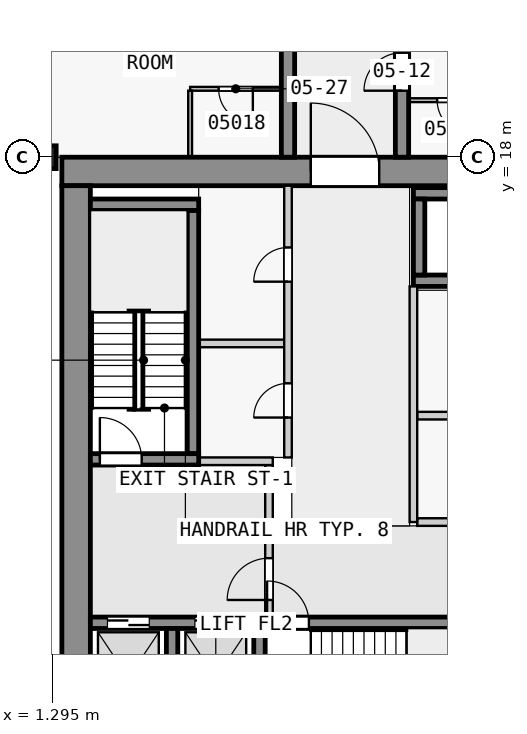
"""IFC4 building model, lengths in metres.
Left out: names, types, materials, properties, quantities, classifications, styles, units other than length and angle.
Written with IfcOpenShell. Run it as: python <this file> out.ifc"""

import sys

from ifc_helpers import new_model, si_unit, direction, frame, frame_2d, origin, origin_2d, place, context, subcontext, project, spatial, rectangle, extrude, element, fill, save


model = new_model("IFC4")
c1 = context("Model", 3, precision=1e-05, world=origin(), true_north=direction((0.0, 1.0)))
c2 = subcontext(c1, "Body", "Model", "MODEL_VIEW")
j1 = project(units=[si_unit("LENGTHUNIT", "METRE"), si_unit("PLANEANGLEUNIT", "RADIAN")], contexts=[c1])
p1 = place(None, origin())
s1 = spatial("IfcSite", under=j1, at=p1, CompositionType="ELEMENT")
p2 = place(p1, origin())
s2 = spatial("IfcBuilding", under=s1, at=p2, CompositionType="ELEMENT")
p3 = place(p2, frame((0.0, 0.0, 26.8)))
s3 = spatial("IfcBuildingStorey", under=s2, at=p3, CompositionType="ELEMENT", Elevation=26.8)
p4 = place(p3, frame((0.7, 18.0, 0.0), z_axis=(0.0, 0.0, 1.0), x_axis=(0.0, 1.0, 0.0)))
e1 = element("IfcColumn", 1, at=p4, inside=s3, PredefinedType="COLUMN", context=c2, shape_type="SweptSolid", body=[
    extrude(rectangle(XDim=0.6, YDim=1.4, at=origin_2d()), origin(), (0.0, 0.0, 1.0), 3.5),
])
p5 = place(p3, frame((1.55, 17.625, 0.0), z_axis=(0.0, 0.0, 1.0), x_axis=(1.0, 0.0, 0.0)))
e2 = element("IfcWall", 2, at=p5, inside=s3, PredefinedType="SHEAR", context=c2, shape_type="SweptSolid", body=[
    extrude(rectangle(XDim=20.95, YDim=0.75, at=frame_2d((10.475, 0.0))), origin(), (0.0, 0.0, 1.0), 3.25),
])
p6 = place(p5, frame((6.55, 0.0, 0.0)))
e3 = element("IfcOpeningElement", 3, at=p6, cuts=e2, PredefinedType="OPENING", context=c2, shape_type="SweptSolid", body=[
    extrude(rectangle(XDim=1.8, YDim=2.1, at=frame_2d((0.9, 1.05))), frame((0.0, 0.385, 0.0), z_axis=(0.0, -1.0, 0.0), x_axis=(1.0, 0.0, 0.0)), (0.0, 0.0, 1.0), 0.77),
])
p7 = place(p3, frame((1.925, 2.5, 0.0), z_axis=(0.0, 0.0, 1.0), x_axis=(0.0, 1.0, 0.0)))
e4 = element("IfcWall", 4, at=p7, inside=s3, PredefinedType="SHEAR", context=c2, shape_type="SweptSolid", body=[
    extrude(rectangle(XDim=14.75, YDim=0.75, at=frame_2d((7.375, 0.0))), origin(), (0.0, 0.0, 1.0), 3.25),
])
for number, where, z_axis, x_axis in (
    (5, (4.45, 2.8, 0.0), (0.0, 0.0, 1.0), (0.0, 1.0, 0.0)),
    (6, (6.75, 2.8, 0.0), (0.0, 0.0, 1.0), (0.0, 1.0, 0.0)),
):
    element("IfcWall", number, at=place(p3, frame(where, z_axis=z_axis, x_axis=x_axis)), inside=s3, PredefinedType="SHEAR", context=c2, shape_type="SweptSolid", body=[
        extrude(rectangle(XDim=2.8, YDim=0.3, at=frame_2d((1.4, 0.0))), origin(), (0.0, 0.0, 1.0), 3.25),
    ])
p8 = place(p3, frame((2.3, 5.75, 0.0), z_axis=(0.0, 0.0, 1.0), x_axis=(1.0, 0.0, 0.0)))
e7 = element("IfcWall", 7, at=p8, inside=s3, PredefinedType="SHEAR", context=c2, shape_type="SweptSolid", body=[
    extrude(rectangle(XDim=18.8, YDim=0.3, at=frame_2d((9.4, 0.0))), origin(), (0.0, 0.0, 1.0), 3.25),
])
p9 = place(p8, frame((4.65, 0.0, 0.0)))
e8 = element("IfcOpeningElement", 8, at=p9, cuts=e7, PredefinedType="OPENING", context=c2, shape_type="SweptSolid", body=[
    extrude(rectangle(XDim=1.1, YDim=2.1, at=frame_2d((0.55, 1.05))), frame((0.0, 0.16, 0.0), z_axis=(0.0, -1.0, 0.0), x_axis=(1.0, 0.0, 0.0)), (0.0, 0.0, 1.0), 0.32),
])
p10 = place(p8, frame((0.45, 0.0, 0.0)))
e9 = element("IfcOpeningElement", 9, at=p10, cuts=e7, PredefinedType="OPENING", context=c2, shape_type="SweptSolid", body=[
    extrude(rectangle(XDim=1.1, YDim=2.1, at=frame_2d((0.55, 1.05))), frame((0.0, 0.16, 0.0), z_axis=(0.0, -1.0, 0.0), x_axis=(1.0, 0.0, 0.0)), (0.0, 0.0, 1.0), 0.32),
])
p11 = place(p8, frame((2.75, 0.0, 0.0)))
e10 = element("IfcOpeningElement", 10, at=p11, cuts=e7, PredefinedType="OPENING", context=c2, shape_type="SweptSolid", body=[
    extrude(rectangle(XDim=1.1, YDim=2.1, at=frame_2d((0.55, 1.05))), frame((0.0, 0.16, 0.0), z_axis=(0.0, -1.0, 0.0), x_axis=(1.0, 0.0, 0.0)), (0.0, 0.0, 1.0), 0.32),
])
p12 = place(p8, frame((11.85, 0.0, 0.0)))
e11 = element("IfcOpeningElement", 11, at=p12, cuts=e7, PredefinedType="OPENING", context=c2, shape_type="SweptSolid", body=[
    extrude(rectangle(XDim=1.1, YDim=2.1, at=frame_2d((0.55, 1.05))), frame((0.0, 0.16, 0.0), z_axis=(0.0, -1.0, 0.0), x_axis=(1.0, 0.0, 0.0)), (0.0, 0.0, 1.0), 0.32),
])
p13 = place(p8, frame((14.35, 0.0, 0.0)))
e12 = element("IfcOpeningElement", 12, at=p13, cuts=e7, PredefinedType="OPENING", context=c2, shape_type="SweptSolid", body=[
    extrude(rectangle(XDim=1.1, YDim=2.1, at=frame_2d((0.55, 1.05))), frame((0.0, 0.16, 0.0), z_axis=(0.0, -1.0, 0.0), x_axis=(1.0, 0.0, 0.0)), (0.0, 0.0, 1.0), 0.32),
])
p14 = place(p8, frame((16.85, 0.0, 0.0)))
e13 = element("IfcOpeningElement", 13, at=p14, cuts=e7, PredefinedType="OPENING", context=c2, shape_type="SweptSolid", body=[
    extrude(rectangle(XDim=1.1, YDim=2.1, at=frame_2d((0.55, 1.05))), frame((0.0, 0.16, 0.0), z_axis=(0.0, -1.0, 0.0), x_axis=(1.0, 0.0, 0.0)), (0.0, 0.0, 1.0), 0.32),
])
p15 = place(p3, frame((2.3, 10.05, 0.0), z_axis=(0.0, 0.0, 1.0), x_axis=(1.0, 0.0, 0.0)))
e14 = element("IfcWall", 14, at=p15, inside=s3, PredefinedType="SHEAR", context=c2, shape_type="SweptSolid", body=[
    extrude(rectangle(XDim=2.85, YDim=0.3, at=frame_2d((1.425, 0.0))), origin(), (0.0, 0.0, 1.0), 3.25),
])
p16 = place(p15, frame((0.25, 0.0, 0.0)))
e15 = element("IfcOpeningElement", 15, at=p16, cuts=e14, PredefinedType="OPENING", context=c2, shape_type="SweptSolid", body=[
    extrude(rectangle(XDim=1.1, YDim=2.1, at=frame_2d((0.55, 1.05))), frame((0.0, 0.16, 0.0), z_axis=(0.0, -1.0, 0.0), x_axis=(1.0, 0.0, 0.0)), (0.0, 0.0, 1.0), 0.32),
])
p17 = place(p3, frame((5.0, 10.2, 0.0), z_axis=(0.0, 0.0, 1.0), x_axis=(0.0, 1.0, 0.0)))
e16 = element("IfcWall", 16, at=p17, inside=s3, PredefinedType="SHEAR", context=c2, shape_type="SweptSolid", body=[
    extrude(rectangle(XDim=6.4, YDim=0.3, at=frame_2d((3.2, 0.0))), origin(), (0.0, 0.0, 1.0), 3.25),
])
p18 = place(p3, frame((2.3, 16.75, 0.0), z_axis=(0.0, 0.0, 1.0), x_axis=(1.0, 0.0, 0.0)))
e17 = element("IfcWall", 17, at=p18, inside=s3, PredefinedType="SHEAR", context=c2, shape_type="SweptSolid", body=[
    extrude(rectangle(XDim=2.85, YDim=0.3, at=frame_2d((1.425, 0.0))), origin(), (0.0, 0.0, 1.0), 3.25),
])
for number, where, z_axis, x_axis in (
    (18, (10.8, 17.05, 0.0), (0.0, 0.0, 1.0), (1.0, 0.0, 0.0)),
    (19, (10.8, 14.75, 0.0), (0.0, 0.0, 1.0), (1.0, 0.0, 0.0)),
):
    element("IfcWall", number, at=place(p3, frame(where, z_axis=z_axis, x_axis=x_axis)), inside=s3, PredefinedType="SHEAR", context=c2, shape_type="SweptSolid", body=[
        extrude(rectangle(XDim=7.8, YDim=0.3, at=frame_2d((3.9, 0.0))), origin(), (0.0, 0.0, 1.0), 3.25),
    ])
p19 = place(p3, frame((10.95, 14.9, 0.0), z_axis=(0.0, 0.0, 1.0), x_axis=(0.0, 1.0, 0.0)))
e20 = element("IfcWall", 20, at=p19, inside=s3, PredefinedType="SHEAR", context=c2, shape_type="SweptSolid", body=[
    extrude(rectangle(XDim=2.0, YDim=0.3, at=frame_2d((1.0, 0.0))), origin(), (0.0, 0.0, 1.0), 3.25),
])
p20 = place(p3, frame((7.5, 18.0, 0.0), z_axis=(0.0, 0.0, 1.0), x_axis=(0.0, 1.0, 0.0)))
e21 = element("IfcWall", 21, at=p20, inside=s3, PredefinedType="SHEAR", context=c2, shape_type="SweptSolid", body=[
    extrude(rectangle(XDim=27.0, YDim=0.35, at=frame_2d((13.5, 0.0))), origin(), (0.0, 0.0, 1.0), 3.25),
])
p21 = place(p20, frame((4.05, 0.0, 0.0)))
e22 = element("IfcOpeningElement", 22, at=p21, cuts=e21, PredefinedType="OPENING", context=c2, shape_type="SweptSolid", body=[
    extrude(rectangle(XDim=1.0, YDim=2.1, at=frame_2d((0.5, 1.05))), frame((0.0, 0.185, 0.0), z_axis=(0.0, -1.0, 0.0), x_axis=(1.0, 0.0, 0.0)), (0.0, 0.0, 1.0), 0.37),
])
p22 = place(p20, frame((13.05, 0.0, 0.0)))
e23 = element("IfcOpeningElement", 23, at=p22, cuts=e21, PredefinedType="OPENING", context=c2, shape_type="SweptSolid", body=[
    extrude(rectangle(XDim=1.0, YDim=2.1, at=frame_2d((0.5, 1.05))), frame((0.0, 0.185, 0.0), z_axis=(0.0, -1.0, 0.0), x_axis=(1.0, 0.0, 0.0)), (0.0, 0.0, 1.0), 0.37),
])
p23 = place(p20, frame((21.35, 0.0, 0.0)))
e24 = element("IfcOpeningElement", 24, at=p23, cuts=e21, PredefinedType="OPENING", context=c2, shape_type="SweptSolid", body=[
    extrude(rectangle(XDim=1.0, YDim=2.1, at=frame_2d((0.5, 1.05))), frame((0.0, 0.185, 0.0), z_axis=(0.0, -1.0, 0.0), x_axis=(1.0, 0.0, 0.0)), (0.0, 0.0, 1.0), 0.37),
])
p24 = place(p3, frame((10.5, 18.0, 0.0), z_axis=(0.0, 0.0, 1.0), x_axis=(0.0, 1.0, 0.0)))
e25 = element("IfcWall", 25, at=p24, inside=s3, PredefinedType="SHEAR", context=c2, shape_type="SweptSolid", body=[
    extrude(rectangle(XDim=27.0, YDim=0.35, at=frame_2d((13.5, 0.0))), origin(), (0.0, 0.0, 1.0), 3.25),
])
p25 = place(p24, frame((1.75, 0.0, 0.0)))
e26 = element("IfcOpeningElement", 26, at=p25, cuts=e25, PredefinedType="OPENING", context=c2, shape_type="SweptSolid", body=[
    extrude(rectangle(XDim=1.0, YDim=2.1, at=frame_2d((0.5, 1.05))), frame((0.0, 0.185, 0.0), z_axis=(0.0, -1.0, 0.0), x_axis=(1.0, 0.0, 0.0)), (0.0, 0.0, 1.0), 0.37),
])
p26 = place(p24, frame((8.55, 0.0, 0.0)))
e27 = element("IfcOpeningElement", 27, at=p26, cuts=e25, PredefinedType="OPENING", context=c2, shape_type="SweptSolid", body=[
    extrude(rectangle(XDim=1.0, YDim=2.1, at=frame_2d((0.5, 1.05))), frame((0.0, 0.185, 0.0), z_axis=(0.0, -1.0, 0.0), x_axis=(1.0, 0.0, 0.0)), (0.0, 0.0, 1.0), 0.37),
])
p27 = place(p24, frame((15.25, 0.0, 0.0)))
e28 = element("IfcOpeningElement", 28, at=p27, cuts=e25, PredefinedType="OPENING", context=c2, shape_type="SweptSolid", body=[
    extrude(rectangle(XDim=1.0, YDim=2.1, at=frame_2d((0.5, 1.05))), frame((0.0, 0.185, 0.0), z_axis=(0.0, -1.0, 0.0), x_axis=(1.0, 0.0, 0.0)), (0.0, 0.0, 1.0), 0.37),
])
p28 = place(p24, frame((19.75, 0.0, 0.0)))
e29 = element("IfcOpeningElement", 29, at=p28, cuts=e25, PredefinedType="OPENING", context=c2, shape_type="SweptSolid", body=[
    extrude(rectangle(XDim=1.0, YDim=2.1, at=frame_2d((0.5, 1.05))), frame((0.0, 0.185, 0.0), z_axis=(0.0, -1.0, 0.0), x_axis=(1.0, 0.0, 0.0)), (0.0, 0.0, 1.0), 0.37),
])
p29 = place(p24, frame((23.25, 0.0, 0.0)))
e30 = element("IfcOpeningElement", 30, at=p29, cuts=e25, PredefinedType="OPENING", context=c2, shape_type="SweptSolid", body=[
    extrude(rectangle(XDim=0.9, YDim=2.1, at=frame_2d((0.45, 1.05))), frame((0.0, 0.185, 0.0), z_axis=(0.0, -1.0, 0.0), x_axis=(1.0, 0.0, 0.0)), (0.0, 0.0, 1.0), 0.37),
])
p30 = place(p24, frame((25.45, 0.0, 0.0)))
e31 = element("IfcOpeningElement", 31, at=p30, cuts=e25, PredefinedType="OPENING", context=c2, shape_type="SweptSolid", body=[
    extrude(rectangle(XDim=1.0, YDim=2.1, at=frame_2d((0.5, 1.05))), frame((0.0, 0.185, 0.0), z_axis=(0.0, -1.0, 0.0), x_axis=(1.0, 0.0, 0.0)), (0.0, 0.0, 1.0), 0.37),
])
p31 = place(p3, frame((7.0, 5.9, 0.0), z_axis=(0.0, 0.0, 1.0), x_axis=(0.0, 1.0, 0.0)))
e32 = element("IfcWall", 32, at=p31, inside=s3, PredefinedType="PARTITIONING", context=c2, shape_type="SweptSolid", body=[
    extrude(rectangle(XDim=4.0, YDim=0.2, at=frame_2d((2.0, 0.0))), origin(), (0.0, 0.0, 1.0), 3.25),
])
p32 = place(p31, frame((0.45, 0.0, 0.0)))
e33 = element("IfcOpeningElement", 33, at=p32, cuts=e32, PredefinedType="OPENING", context=c2, shape_type="SweptSolid", body=[
    extrude(rectangle(XDim=1.1, YDim=2.1, at=frame_2d((0.55, 1.05))), frame((0.0, 0.11, 0.0), z_axis=(0.0, -1.0, 0.0), x_axis=(1.0, 0.0, 0.0)), (0.0, 0.0, 1.0), 0.22),
])
p33 = place(p3, frame((5.15, 10.0, 0.0), z_axis=(0.0, 0.0, 1.0), x_axis=(1.0, 0.0, 0.0)))
e34 = element("IfcWall", 34, at=p33, inside=s3, PredefinedType="PARTITIONING", context=c2, shape_type="SweptSolid", body=[
    extrude(rectangle(XDim=1.95, YDim=0.2, at=frame_2d((0.975, 0.0))), origin(), (0.0, 0.0, 1.0), 3.25),
])
p34 = place(p3, frame((10.8, 8.4, 0.0), z_axis=(0.0, 0.0, 1.0), x_axis=(0.0, 1.0, 0.0)))
e35 = element("IfcWall", 35, at=p34, inside=s3, PredefinedType="PARTITIONING", context=c2, shape_type="SweptSolid", body=[
    extrude(rectangle(XDim=6.2, YDim=0.2, at=frame_2d((3.1, 0.0))), origin(), (0.0, 0.0, 1.0), 3.25),
])
for number, where, z_axis, x_axis in (
    (36, (10.9, 8.4, 0.0), (0.0, 0.0, 1.0), (1.0, 0.0, 0.0)),
    (37, (10.9, 11.2, 0.0), (0.0, 0.0, 1.0), (1.0, 0.0, 0.0)),
):
    element("IfcWall", number, at=place(p3, frame(where, z_axis=z_axis, x_axis=x_axis)), inside=s3, PredefinedType="PARTITIONING", context=c2, shape_type="SweptSolid", body=[
        extrude(rectangle(XDim=7.4, YDim=0.2, at=frame_2d((3.7, 0.0))), origin(), (0.0, 0.0, 1.0), 3.25),
    ])
p35 = place(p3, frame((7.5, 10.1, 0.0), z_axis=(0.0, 0.0, 1.0), x_axis=(0.0, 1.0, 0.0)))
e38 = element("IfcWall", 38, at=p35, inside=s3, PredefinedType="PARTITIONING", context=c2, shape_type="SweptSolid", body=[
    extrude(rectangle(XDim=7.15, YDim=0.2, at=frame_2d((3.575, 0.0))), origin(), (0.0, 0.0, 1.0), 3.25),
])
p36 = place(p35, frame((1.05, 0.0, 0.0)))
e39 = element("IfcOpeningElement", 39, at=p36, cuts=e38, PredefinedType="OPENING", context=c2, shape_type="SweptSolid", body=[
    extrude(rectangle(XDim=0.9, YDim=2.1, at=frame_2d((0.45, 1.05))), frame((0.0, 0.11, 0.0), z_axis=(0.0, -1.0, 0.0), x_axis=(1.0, 0.0, 0.0)), (0.0, 0.0, 1.0), 0.22),
])
p37 = place(p35, frame((4.625, 0.0, 0.0)))
e40 = element("IfcOpeningElement", 40, at=p37, cuts=e38, PredefinedType="OPENING", context=c2, shape_type="SweptSolid", body=[
    extrude(rectangle(XDim=0.9, YDim=2.1, at=frame_2d((0.45, 1.05))), frame((0.0, 0.11, 0.0), z_axis=(0.0, -1.0, 0.0), x_axis=(1.0, 0.0, 0.0)), (0.0, 0.0, 1.0), 0.22),
])
p38 = place(p3, frame((5.15, 13.1, 0.0), z_axis=(0.0, 0.0, 1.0), x_axis=(1.0, 0.0, 0.0)))
e41 = element("IfcWall", 41, at=p38, inside=s3, PredefinedType="PARTITIONING", context=c2, shape_type="SweptSolid", body=[
    extrude(rectangle(XDim=2.25, YDim=0.2, at=frame_2d((1.125, 0.0))), origin(), (0.0, 0.0, 1.0), 3.25),
])
p39 = place(p3, frame((13.075, 19.5, 0.0), z_axis=(0.0, 0.0, 1.0), x_axis=(-1.0, 0.0, 0.0)))
e42 = element("IfcWall", 42, at=p39, inside=s3, PredefinedType="PARTITIONING", context=c2, shape_type="SweptSolid", body=[
    extrude(rectangle(XDim=2.4, YDim=0.1, at=frame_2d((1.2, 0.0))), origin(), (0.0, 0.0, 1.0), 3.25),
])
p40 = place(p39, frame((0.75, 0.0, 0.0)))
e43 = element("IfcOpeningElement", 43, at=p40, cuts=e42, PredefinedType="OPENING", context=c2, shape_type="SweptSolid", body=[
    extrude(rectangle(XDim=0.9, YDim=2.1, at=frame_2d((0.45, 1.05))), frame((0.0, 0.06, 0.0), z_axis=(0.0, -1.0, 0.0), x_axis=(1.0, 0.0, 0.0)), (0.0, 0.0, 1.0), 0.12),
])
p41 = place(p3, frame((7.325, 19.8, 0.0), z_axis=(0.0, 0.0, 1.0), x_axis=(-1.0, 0.0, 0.0)))
e44 = element("IfcWall", 44, at=p41, inside=s3, PredefinedType="PARTITIONING", context=c2, shape_type="SweptSolid", body=[
    extrude(rectangle(XDim=2.4, YDim=0.1, at=frame_2d((1.2, 0.0))), origin(), (0.0, 0.0, 1.0), 3.25),
])
p42 = place(p41, frame((0.75, 0.0, 0.0)))
e45 = element("IfcOpeningElement", 45, at=p42, cuts=e44, PredefinedType="OPENING", context=c2, shape_type="SweptSolid", body=[
    extrude(rectangle(XDim=0.9, YDim=2.1, at=frame_2d((0.45, 1.05))), frame((0.0, 0.06, 0.0), z_axis=(0.0, -1.0, 0.0), x_axis=(1.0, 0.0, 0.0)), (0.0, 0.0, 1.0), 0.12),
])
p43 = place(p3, frame((4.925, 19.75, 0.0), z_axis=(0.0, 0.0, 1.0), x_axis=(0.0, -1.0, 0.0)))
e46 = element("IfcWall", 46, at=p43, inside=s3, PredefinedType="PARTITIONING", context=c2, shape_type="SweptSolid", body=[
    extrude(rectangle(XDim=1.75, YDim=0.1, at=frame_2d((0.875, 0.0))), origin(), (0.0, 0.0, 1.0), 3.25),
])
p44 = place(p32, origin())
e47 = element("IfcDoor", 47, at=p44, inside=s3, OperationType="SINGLE_SWING_LEFT", PredefinedType="DOOR", context=c2, shape_type="SweptSolid", body=[
    extrude(rectangle(XDim=1.1, YDim=2.1, at=frame_2d((0.55, 1.05))), frame((0.0, 0.025, 0.0), z_axis=(0.0, -1.0, 0.0), x_axis=(1.0, 0.0, 0.0)), (0.0, 0.0, 1.0), 0.05),
])
fill(e33, e47)
p45 = place(p16, origin())
e48 = element("IfcDoor", 48, at=p45, inside=s3, OperationType="SINGLE_SWING_RIGHT", PredefinedType="DOOR", context=c2, shape_type="SweptSolid", body=[
    extrude(rectangle(XDim=1.1, YDim=2.1, at=frame_2d((0.55, 1.05))), frame((0.0, 0.025, 0.0), z_axis=(0.0, -1.0, 0.0), x_axis=(1.0, 0.0, 0.0)), (0.0, 0.0, 1.0), 0.05),
])
fill(e15, e48)
p46 = place(p9, origin())
e49 = element("IfcDoor", 49, at=p46, inside=s3, OperationType="SINGLE_SWING_LEFT", PredefinedType="DOOR", context=c2, shape_type="SweptSolid", body=[
    extrude(rectangle(XDim=1.1, YDim=2.1, at=frame_2d((0.55, 1.05))), frame((0.0, 0.025, 0.0), z_axis=(0.0, -1.0, 0.0), x_axis=(1.0, 0.0, 0.0)), (0.0, 0.0, 1.0), 0.05),
])
fill(e8, e49)
p47 = place(p10, origin())
e50 = element("IfcDoor", 50, at=p47, inside=s3, OperationType="DOUBLE_DOOR_SLIDING", PredefinedType="DOOR", context=c2, shape_type="SweptSolid", body=[
    extrude(rectangle(XDim=1.1, YDim=2.1, at=frame_2d((0.55, 1.05))), frame((0.0, 0.025, 0.0), z_axis=(0.0, -1.0, 0.0), x_axis=(1.0, 0.0, 0.0)), (0.0, 0.0, 1.0), 0.05),
])
fill(e9, e50)
p48 = place(p11, origin())
e51 = element("IfcDoor", 51, at=p48, inside=s3, OperationType="DOUBLE_DOOR_SLIDING", PredefinedType="DOOR", context=c2, shape_type="SweptSolid", body=[
    extrude(rectangle(XDim=1.1, YDim=2.1, at=frame_2d((0.55, 1.05))), frame((0.0, 0.025, 0.0), z_axis=(0.0, -1.0, 0.0), x_axis=(1.0, 0.0, 0.0)), (0.0, 0.0, 1.0), 0.05),
])
fill(e10, e51)
p49 = place(p6, origin())
e52 = element("IfcDoor", 52, at=p49, inside=s3, OperationType="DOUBLE_DOOR_SINGLE_SWING", PredefinedType="DOOR", context=c2, shape_type="SweptSolid", body=[
    extrude(rectangle(XDim=1.8, YDim=2.1, at=frame_2d((0.9, 1.05))), frame((0.0, 0.025, 0.0), z_axis=(0.0, -1.0, 0.0), x_axis=(1.0, 0.0, 0.0)), (0.0, 0.0, 1.0), 0.05),
])
fill(e3, e52)
p50 = place(p36, origin())
e53 = element("IfcDoor", 53, at=p50, inside=s3, OperationType="SINGLE_SWING_RIGHT", PredefinedType="DOOR", context=c2, shape_type="SweptSolid", body=[
    extrude(rectangle(XDim=0.9, YDim=2.1, at=frame_2d((0.45, 1.05))), frame((0.0, 0.025, 0.0), z_axis=(0.0, -1.0, 0.0), x_axis=(1.0, 0.0, 0.0)), (0.0, 0.0, 1.0), 0.05),
])
fill(e39, e53)
p51 = place(p37, origin())
e54 = element("IfcDoor", 54, at=p51, inside=s3, OperationType="SINGLE_SWING_RIGHT", PredefinedType="DOOR", context=c2, shape_type="SweptSolid", body=[
    extrude(rectangle(XDim=0.9, YDim=2.1, at=frame_2d((0.45, 1.05))), frame((0.0, 0.025, 0.0), z_axis=(0.0, -1.0, 0.0), x_axis=(1.0, 0.0, 0.0)), (0.0, 0.0, 1.0), 0.05),
])
fill(e40, e54)
p52 = place(p25, origin())
e55 = element("IfcDoor", 55, at=p52, inside=s3, OperationType="SINGLE_SWING_LEFT", PredefinedType="DOOR", context=c2, shape_type="SweptSolid", body=[
    extrude(rectangle(XDim=1.0, YDim=2.1, at=frame_2d((0.5, 1.05))), frame((0.0, 0.025, 0.0), z_axis=(0.0, -1.0, 0.0), x_axis=(1.0, 0.0, 0.0)), (0.0, 0.0, 1.0), 0.05),
])
fill(e26, e55)
p53 = place(p42, origin())
e56 = element("IfcDoor", 56, at=p53, inside=s3, OperationType="SINGLE_SWING_LEFT", PredefinedType="DOOR", context=c2, shape_type="SweptSolid", body=[
    extrude(rectangle(XDim=0.9, YDim=2.1, at=frame_2d((0.45, 1.05))), frame((0.0, 0.025, 0.0), z_axis=(0.0, -1.0, 0.0), x_axis=(1.0, 0.0, 0.0)), (0.0, 0.0, 1.0), 0.05),
])
fill(e45, e56)
p54 = place(p40, origin())
e57 = element("IfcDoor", 57, at=p54, inside=s3, OperationType="SINGLE_SWING_RIGHT", PredefinedType="DOOR", context=c2, shape_type="SweptSolid", body=[
    extrude(rectangle(XDim=0.9, YDim=2.1, at=frame_2d((0.45, 1.05))), frame((0.0, 0.025, 0.0), z_axis=(0.0, -1.0, 0.0), x_axis=(1.0, 0.0, 0.0)), (0.0, 0.0, 1.0), 0.05),
])
fill(e43, e57)
save(model, sys.argv[1])
